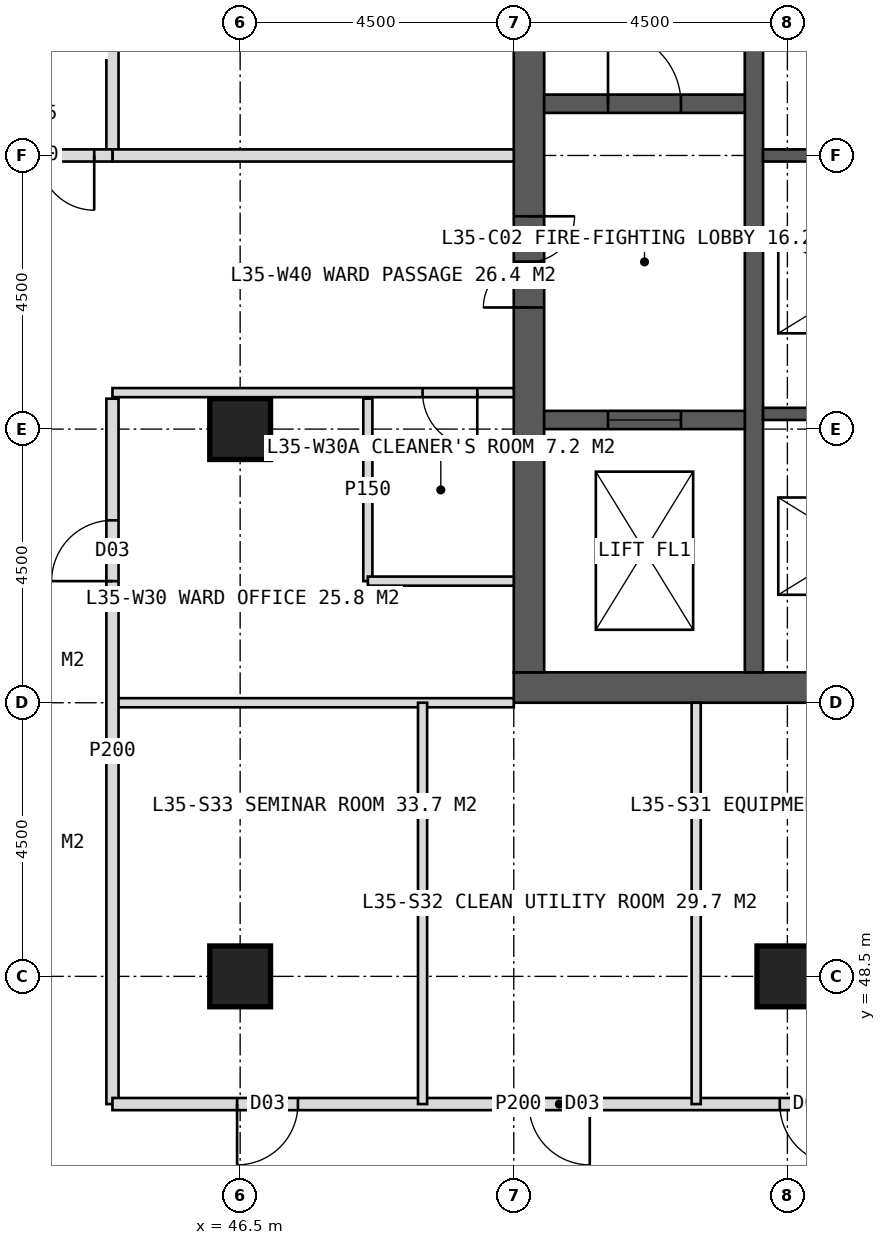
"""IFC4 building model, lengths in metres.
Left out: names, types, materials, properties, quantities, classifications, styles, units other than length and angle.
Written with IfcOpenShell. Run it as: python <this file> out.ifc"""

import sys

from ifc_helpers import new_model, si_unit, direction, frame, frame_2d, origin, origin_2d, place, context, subcontext, project, spatial, rectangle, hollow_rectangle, extrude, element, fill, save


model = new_model("IFC4")
c1 = context("Model", 3, precision=1e-05, world=origin(), true_north=direction((0.0, 1.0)))
c2 = subcontext(c1, "Body", "Model", "MODEL_VIEW")
j1 = project(units=[si_unit("LENGTHUNIT", "METRE"), si_unit("PLANEANGLEUNIT", "RADIAN")], contexts=[c1])
p1 = place(None, origin())
s1 = spatial("IfcSite", under=j1, at=p1, CompositionType="ELEMENT")
p2 = place(p1, origin())
s2 = spatial("IfcBuilding", under=s1, at=p2, CompositionType="ELEMENT")
p3 = place(p2, frame((0.0, 0.0, 148.0)))
s3 = spatial("IfcBuildingStorey", under=s2, at=p3, CompositionType="ELEMENT", Elevation=148.0)
p4 = place(p3, frame((51.0, 53.25, 0.0), z_axis=(0.0, 0.0, 1.0), x_axis=(1.0, 0.0, 0.0)))
e1 = element("IfcWall", 1, at=p4, inside=s3, PredefinedType="SHEAR", context=c2, shape_type="SweptSolid", body=[
    extrude(rectangle(XDim=18.0, YDim=0.5, at=frame_2d((9.0, 0.0))), origin(), (0.0, 0.0, 1.0), 4.0),
])
p5 = place(p4, frame((8.1, 0.0, 0.0)))
e2 = element("IfcOpeningElement", 2, at=p5, cuts=e1, PredefinedType="OPENING", context=c2, shape_type="SweptSolid", body=[
    extrude(rectangle(XDim=1.8, YDim=2.2, at=frame_2d((0.9, 1.1))), frame((0.0, 0.26, 0.0), z_axis=(0.0, -1.0, 0.0), x_axis=(1.0, 0.0, 0.0)), (0.0, 0.0, 1.0), 0.52),
])
p6 = place(p3, frame((51.25, 53.5, 0.0), z_axis=(0.0, 0.0, 1.0), x_axis=(0.0, 1.0, 0.0)))
e3 = element("IfcWall", 3, at=p6, inside=s3, PredefinedType="SHEAR", context=c2, shape_type="SweptSolid", body=[
    extrude(rectangle(XDim=17.0, YDim=0.5, at=frame_2d((8.5, 0.0))), origin(), (0.0, 0.0, 1.0), 4.0),
])
p7 = place(p6, frame((6.0, 0.0, 0.0)))
e4 = element("IfcOpeningElement", 4, at=p7, cuts=e3, PredefinedType="OPENING", context=c2, shape_type="SweptSolid", body=[
    extrude(rectangle(XDim=1.5, YDim=2.2, at=frame_2d((0.75, 1.1))), frame((0.0, 0.26, 0.0), z_axis=(0.0, -1.0, 0.0), x_axis=(1.0, 0.0, 0.0)), (0.0, 0.0, 1.0), 0.52),
])
p8 = place(p3, frame((54.95, 53.5, 0.0), z_axis=(0.0, 0.0, 1.0), x_axis=(0.0, 1.0, 0.0)))
e5 = element("IfcWall", 5, at=p8, inside=s3, PredefinedType="SHEAR", context=c2, shape_type="SweptSolid", body=[
    extrude(rectangle(XDim=17.0, YDim=0.3, at=frame_2d((8.5, 0.0))), origin(), (0.0, 0.0, 1.0), 4.0),
])
for number, where, z_axis, x_axis in (
    (6, (55.1, 57.75, 0.0), (0.0, 0.0, 1.0), (1.0, 0.0, 0.0)),
    (7, (55.1, 62.0, 0.0), (0.0, 0.0, 1.0), (1.0, 0.0, 0.0)),
):
    element("IfcWall", number, at=place(p3, frame(where, z_axis=z_axis, x_axis=x_axis)), inside=s3, PredefinedType="SHEAR", context=c2, shape_type="SweptSolid", body=[
        extrude(rectangle(XDim=3.05, YDim=0.2, at=frame_2d((1.525, 0.0))), origin(), (0.0, 0.0, 1.0), 4.0),
    ])
p9 = place(p3, frame((51.5, 62.85, 0.0), z_axis=(0.0, 0.0, 1.0), x_axis=(1.0, 0.0, 0.0)))
e8 = element("IfcWall", 8, at=p9, inside=s3, PredefinedType="SHEAR", context=c2, shape_type="SweptSolid", body=[
    extrude(rectangle(XDim=3.3, YDim=0.3, at=frame_2d((1.65, 0.0))), origin(), (0.0, 0.0, 1.0), 4.0),
])
p10 = place(p9, frame((1.05, 0.0, 0.0)))
e9 = element("IfcOpeningElement", 9, at=p10, cuts=e8, PredefinedType="OPENING", context=c2, shape_type="SweptSolid", body=[
    extrude(rectangle(XDim=1.2, YDim=2.1, at=frame_2d((0.6, 1.05))), frame((0.0, 0.16, 0.0), z_axis=(0.0, -1.0, 0.0), x_axis=(1.0, 0.0, 0.0)), (0.0, 0.0, 1.0), 0.32),
])
p11 = place(p3, frame((51.5, 57.65, 0.0), z_axis=(0.0, 0.0, 1.0), x_axis=(1.0, 0.0, 0.0)))
e10 = element("IfcWall", 10, at=p11, inside=s3, PredefinedType="SHEAR", context=c2, shape_type="SweptSolid", body=[
    extrude(rectangle(XDim=3.3, YDim=0.3, at=frame_2d((1.65, 0.0))), origin(), (0.0, 0.0, 1.0), 4.0),
])
p12 = place(p11, frame((1.05, 0.0, 0.0)))
e11 = element("IfcOpeningElement", 11, at=p12, cuts=e10, PredefinedType="OPENING", context=c2, shape_type="SweptSolid", body=[
    extrude(rectangle(XDim=1.2, YDim=2.2, at=frame_2d((0.6, 1.1))), frame((0.0, 0.16, 0.0), z_axis=(0.0, -1.0, 0.0), x_axis=(1.0, 0.0, 0.0)), (0.0, 0.0, 1.0), 0.32),
])
for number, where, z_axis, x_axis in (
    (12, (46.5, 48.5, 0.0), (0.0, 0.0, 1.0), (1.0, 0.0, 0.0)),
    (13, (55.5, 48.5, 0.0), (0.0, 0.0, 1.0), (1.0, 0.0, 0.0)),
    (14, (46.5, 57.5, 0.0), (0.0, 0.0, 1.0), (1.0, 0.0, 0.0)),
):
    element("IfcColumn", number, at=place(p3, frame(where, z_axis=z_axis, x_axis=x_axis)), inside=s3, PredefinedType="COLUMN", context=c2, shape_type="SweptSolid", body=[
        extrude(hollow_rectangle(XDim=1.0, YDim=1.0, WallThickness=0.1, at=origin_2d()), origin(), (0.0, 0.0, 1.0), 4.0),
    ])
p13 = place(p3, frame((51.0, 53.0, 0.0), z_axis=(0.0, 0.0, 1.0), x_axis=(-1.0, 0.0, 0.0)))
e15 = element("IfcWall", 15, at=p13, inside=s3, PredefinedType="PARTITIONING", context=c2, shape_type="SweptSolid", body=[
    extrude(rectangle(XDim=6.6, YDim=0.15, at=frame_2d((3.3, 0.0))), origin(), (0.0, 0.0, 1.0), 3.75),
])
p14 = place(p3, frame((44.4, 46.4, 0.0), z_axis=(0.0, 0.0, 1.0), x_axis=(0.0, 1.0, 0.0)))
e16 = element("IfcWall", 16, at=p14, inside=s3, PredefinedType="PARTITIONING", context=c2, shape_type="SweptSolid", body=[
    extrude(rectangle(XDim=11.6, YDim=0.2, at=frame_2d((5.8, 0.0))), origin(), (0.0, 0.0, 1.0), 3.75),
])
p15 = place(p14, frame((8.6, 0.0, 0.0)))
e17 = element("IfcOpeningElement", 17, at=p15, cuts=e16, PredefinedType="OPENING", context=c2, shape_type="SweptSolid", body=[
    extrude(rectangle(XDim=1.0, YDim=2.1, at=frame_2d((0.5, 1.05))), frame((0.0, 0.11, 0.0), z_axis=(0.0, -1.0, 0.0), x_axis=(1.0, 0.0, 0.0)), (0.0, 0.0, 1.0), 0.22),
])
p16 = place(p3, frame((44.4, 62.0, 0.0), z_axis=(0.0, 0.0, 1.0), x_axis=(0.0, 1.0, 0.0)))
e18 = element("IfcWall", 18, at=p16, inside=s3, PredefinedType="PARTITIONING", context=c2, shape_type="SweptSolid", body=[
    extrude(rectangle(XDim=15.6, YDim=0.2, at=frame_2d((7.8, 0.0))), origin(), (0.0, 0.0, 1.0), 3.75),
])
p17 = place(p16, frame((3.25, 0.0, 0.0)))
e19 = element("IfcOpeningElement", 19, at=p17, cuts=e18, PredefinedType="OPENING", context=c2, shape_type="SweptSolid", body=[
    extrude(rectangle(XDim=1.0, YDim=2.1, at=frame_2d((0.5, 1.05))), frame((0.0, 0.11, 0.0), z_axis=(0.0, -1.0, 0.0), x_axis=(1.0, 0.0, 0.0)), (0.0, 0.0, 1.0), 0.22),
])
p18 = place(p16, frame((9.25, 0.0, 0.0)))
e20 = element("IfcOpeningElement", 20, at=p18, cuts=e18, PredefinedType="OPENING", context=c2, shape_type="SweptSolid", body=[
    extrude(rectangle(XDim=1.0, YDim=2.1, at=frame_2d((0.5, 1.05))), frame((0.0, 0.11, 0.0), z_axis=(0.0, -1.0, 0.0), x_axis=(1.0, 0.0, 0.0)), (0.0, 0.0, 1.0), 0.22),
])
p19 = place(p16, frame((13.3, 0.0, 0.0)))
e21 = element("IfcOpeningElement", 21, at=p19, cuts=e18, PredefinedType="OPENING", context=c2, shape_type="SweptSolid", body=[
    extrude(rectangle(XDim=1.0, YDim=2.1, at=frame_2d((0.5, 1.05))), frame((0.0, 0.11, 0.0), z_axis=(0.0, -1.0, 0.0), x_axis=(1.0, 0.0, 0.0)), (0.0, 0.0, 1.0), 0.22),
])
p20 = place(p3, frame((51.0, 58.1, 0.0), z_axis=(0.0, 0.0, 1.0), x_axis=(-1.0, 0.0, 0.0)))
e22 = element("IfcWall", 22, at=p20, inside=s3, PredefinedType="PARTITIONING", context=c2, shape_type="SweptSolid", body=[
    extrude(rectangle(XDim=6.6, YDim=0.15, at=frame_2d((3.3, 0.0))), origin(), (0.0, 0.0, 1.0), 3.75),
])
p21 = place(p20, frame((0.6, 0.0, 0.0)))
e23 = element("IfcOpeningElement", 23, at=p21, cuts=e22, PredefinedType="OPENING", context=c2, shape_type="SweptSolid", body=[
    extrude(rectangle(XDim=0.9, YDim=2.1, at=frame_2d((0.45, 1.05))), frame((0.0, 0.085, 0.0), z_axis=(0.0, -1.0, 0.0), x_axis=(1.0, 0.0, 0.0)), (0.0, 0.0, 1.0), 0.17),
])
p22 = place(p3, frame((51.0, 62.0, 0.0), z_axis=(0.0, 0.0, 1.0), x_axis=(-1.0, 0.0, 0.0)))
e24 = element("IfcWall", 24, at=p22, inside=s3, PredefinedType="SOLIDWALL", context=c2, shape_type="SweptSolid", body=[
    extrude(rectangle(XDim=6.6, YDim=0.2, at=frame_2d((3.3, 0.0))), origin(), (0.0, 0.0, 1.0), 2.95),
])
p23 = place(p3, frame((48.6, 55.0, 0.0), z_axis=(0.0, 0.0, 1.0), x_axis=(0.0, 1.0, 0.0)))
e25 = element("IfcWall", 25, at=p23, inside=s3, PredefinedType="PARTITIONING", context=c2, shape_type="SweptSolid", body=[
    extrude(rectangle(XDim=3.0, YDim=0.15, at=frame_2d((1.5, 0.0))), origin(), (0.0, 0.0, 1.0), 3.75),
])
p24 = place(p3, frame((51.0, 55.0, 0.0), z_axis=(0.0, 0.0, 1.0), x_axis=(-1.0, 0.0, 0.0)))
e26 = element("IfcWall", 26, at=p24, inside=s3, PredefinedType="PARTITIONING", context=c2, shape_type="SweptSolid", body=[
    extrude(rectangle(XDim=2.4, YDim=0.15, at=frame_2d((1.2, 0.0))), origin(), (0.0, 0.0, 1.0), 3.75),
])
p25 = place(p3, frame((57.75, 46.4, 0.0), z_axis=(0.0, 0.0, 1.0), x_axis=(-1.0, 0.0, 0.0)))
e27 = element("IfcWall", 27, at=p25, inside=s3, PredefinedType="PARTITIONING", context=c2, shape_type="SweptSolid", body=[
    extrude(rectangle(XDim=13.35, YDim=0.2, at=frame_2d((6.675, 0.0))), origin(), (0.0, 0.0, 1.0), 3.75),
])
p26 = place(p25, frame((1.375, 0.0, 0.0)))
e28 = element("IfcOpeningElement", 28, at=p26, cuts=e27, PredefinedType="OPENING", context=c2, shape_type="SweptSolid", body=[
    extrude(rectangle(XDim=1.0, YDim=2.1, at=frame_2d((0.5, 1.05))), frame((0.0, 0.11, 0.0), z_axis=(0.0, -1.0, 0.0), x_axis=(1.0, 0.0, 0.0)), (0.0, 0.0, 1.0), 0.22),
])
p27 = place(p25, frame((5.5, 0.0, 0.0)))
e29 = element("IfcOpeningElement", 29, at=p27, cuts=e27, PredefinedType="OPENING", context=c2, shape_type="SweptSolid", body=[
    extrude(rectangle(XDim=1.0, YDim=2.1, at=frame_2d((0.5, 1.05))), frame((0.0, 0.11, 0.0), z_axis=(0.0, -1.0, 0.0), x_axis=(1.0, 0.0, 0.0)), (0.0, 0.0, 1.0), 0.22),
])
p28 = place(p25, frame((10.3, 0.0, 0.0)))
e30 = element("IfcOpeningElement", 30, at=p28, cuts=e27, PredefinedType="OPENING", context=c2, shape_type="SweptSolid", body=[
    extrude(rectangle(XDim=1.0, YDim=2.1, at=frame_2d((0.5, 1.05))), frame((0.0, 0.11, 0.0), z_axis=(0.0, -1.0, 0.0), x_axis=(1.0, 0.0, 0.0)), (0.0, 0.0, 1.0), 0.22),
])
for number, where, z_axis, x_axis in (
    (31, (54.0, 53.0, 0.0), (0.0, 0.0, 1.0), (0.0, -1.0, 0.0)),
    (32, (49.5, 53.0, 0.0), (0.0, 0.0, 1.0), (0.0, -1.0, 0.0)),
):
    element("IfcWall", number, at=place(p3, frame(where, z_axis=z_axis, x_axis=x_axis)), inside=s3, PredefinedType="PARTITIONING", context=c2, shape_type="SweptSolid", body=[
        extrude(rectangle(XDim=6.6, YDim=0.15, at=frame_2d((3.3, 0.0))), origin(), (0.0, 0.0, 1.0), 3.75),
    ])
p29 = place(p3, frame((44.4, 62.0, 0.0), z_axis=(0.0, 0.0, 1.0), x_axis=(-1.0, 0.0, 0.0)))
e33 = element("IfcWall", 33, at=p29, inside=s3, PredefinedType="SOLIDWALL", context=c2, shape_type="SweptSolid", body=[
    extrude(rectangle(XDim=2.7, YDim=0.2, at=frame_2d((1.35, 0.0))), origin(), (0.0, 0.0, 1.0), 2.95),
])
p30 = place(p29, frame((0.3, 0.0, 0.0)))
e34 = element("IfcOpeningElement", 34, at=p30, cuts=e33, PredefinedType="OPENING", context=c2, shape_type="SweptSolid", body=[
    extrude(rectangle(XDim=1.8, YDim=2.2, at=frame_2d((0.9, 1.1))), frame((0.0, 0.11, 0.0), z_axis=(0.0, -1.0, 0.0), x_axis=(1.0, 0.0, 0.0)), (0.0, 0.0, 1.0), 0.22),
])
p31 = place(p21, origin())
e35 = element("IfcDoor", 35, at=p31, inside=s3, OperationType="SINGLE_SWING_LEFT", PredefinedType="DOOR", context=c2, shape_type="SweptSolid", body=[
    extrude(rectangle(XDim=0.9, YDim=2.1, at=frame_2d((0.45, 1.05))), frame((0.0, 0.025, 0.0), z_axis=(0.0, -1.0, 0.0), x_axis=(1.0, 0.0, 0.0)), (0.0, 0.0, 1.0), 0.05),
])
fill(e23, e35)
p32 = place(p15, origin())
e36 = element("IfcDoor", 36, at=p32, inside=s3, OperationType="SINGLE_SWING_LEFT", PredefinedType="DOOR", context=c2, shape_type="SweptSolid", body=[
    extrude(rectangle(XDim=1.0, YDim=2.1, at=frame_2d((0.5, 1.05))), frame((0.0, 0.025, 0.0), z_axis=(0.0, -1.0, 0.0), x_axis=(1.0, 0.0, 0.0)), (0.0, 0.0, 1.0), 0.05),
])
fill(e17, e36)
p33 = place(p26, origin())
e37 = element("IfcDoor", 37, at=p33, inside=s3, OperationType="SINGLE_SWING_LEFT", PredefinedType="DOOR", context=c2, shape_type="SweptSolid", body=[
    extrude(rectangle(XDim=1.0, YDim=2.1, at=frame_2d((0.5, 1.05))), frame((0.0, 0.025, 0.0), z_axis=(0.0, -1.0, 0.0), x_axis=(1.0, 0.0, 0.0)), (0.0, 0.0, 1.0), 0.05),
])
fill(e28, e37)
p34 = place(p27, origin())
e38 = element("IfcDoor", 38, at=p34, inside=s3, OperationType="SINGLE_SWING_LEFT", PredefinedType="DOOR", context=c2, shape_type="SweptSolid", body=[
    extrude(rectangle(XDim=1.0, YDim=2.1, at=frame_2d((0.5, 1.05))), frame((0.0, 0.025, 0.0), z_axis=(0.0, -1.0, 0.0), x_axis=(1.0, 0.0, 0.0)), (0.0, 0.0, 1.0), 0.05),
])
fill(e29, e38)
p35 = place(p28, origin())
e39 = element("IfcDoor", 39, at=p35, inside=s3, OperationType="SINGLE_SWING_RIGHT", PredefinedType="DOOR", context=c2, shape_type="SweptSolid", body=[
    extrude(rectangle(XDim=1.0, YDim=2.1, at=frame_2d((0.5, 1.05))), frame((0.0, 0.025, 0.0), z_axis=(0.0, -1.0, 0.0), x_axis=(1.0, 0.0, 0.0)), (0.0, 0.0, 1.0), 0.05),
])
fill(e30, e39)
p36 = place(p30, origin())
e40 = element("IfcDoor", 40, at=p36, inside=s3, OperationType="DOUBLE_DOOR_DOUBLE_SWING", PredefinedType="DOOR", context=c2, shape_type="SweptSolid", body=[
    extrude(rectangle(XDim=1.8, YDim=2.2, at=frame_2d((0.9, 1.1))), frame((0.0, 0.025, 0.0), z_axis=(0.0, -1.0, 0.0), x_axis=(1.0, 0.0, 0.0)), (0.0, 0.0, 1.0), 0.05),
])
fill(e34, e40)
p37 = place(p7, origin())
e41 = element("IfcDoor", 41, at=p37, inside=s3, OperationType="DOUBLE_DOOR_SINGLE_SWING", PredefinedType="DOOR", context=c2, shape_type="SweptSolid", body=[
    extrude(rectangle(XDim=1.5, YDim=2.2, at=frame_2d((0.75, 1.1))), frame((0.0, 0.025, 0.0), z_axis=(0.0, -1.0, 0.0), x_axis=(1.0, 0.0, 0.0)), (0.0, 0.0, 1.0), 0.05),
])
fill(e4, e41)
p38 = place(p10, origin())
e42 = element("IfcDoor", 42, at=p38, inside=s3, OperationType="SINGLE_SWING_LEFT", PredefinedType="DOOR", context=c2, shape_type="SweptSolid", body=[
    extrude(rectangle(XDim=1.2, YDim=2.1, at=frame_2d((0.6, 1.05))), frame((0.0, 0.025, 0.0), z_axis=(0.0, -1.0, 0.0), x_axis=(1.0, 0.0, 0.0)), (0.0, 0.0, 1.0), 0.05),
])
fill(e9, e42)
p39 = place(p12, origin())
e43 = element("IfcDoor", 43, at=p39, inside=s3, OperationType="SLIDING_TO_LEFT", PredefinedType="DOOR", context=c2, shape_type="SweptSolid", body=[
    extrude(rectangle(XDim=1.2, YDim=2.2, at=frame_2d((0.6, 1.1))), frame((0.0, 0.025, 0.0), z_axis=(0.0, -1.0, 0.0), x_axis=(1.0, 0.0, 0.0)), (0.0, 0.0, 1.0), 0.05),
])
fill(e11, e43)
save(model, sys.argv[1])
